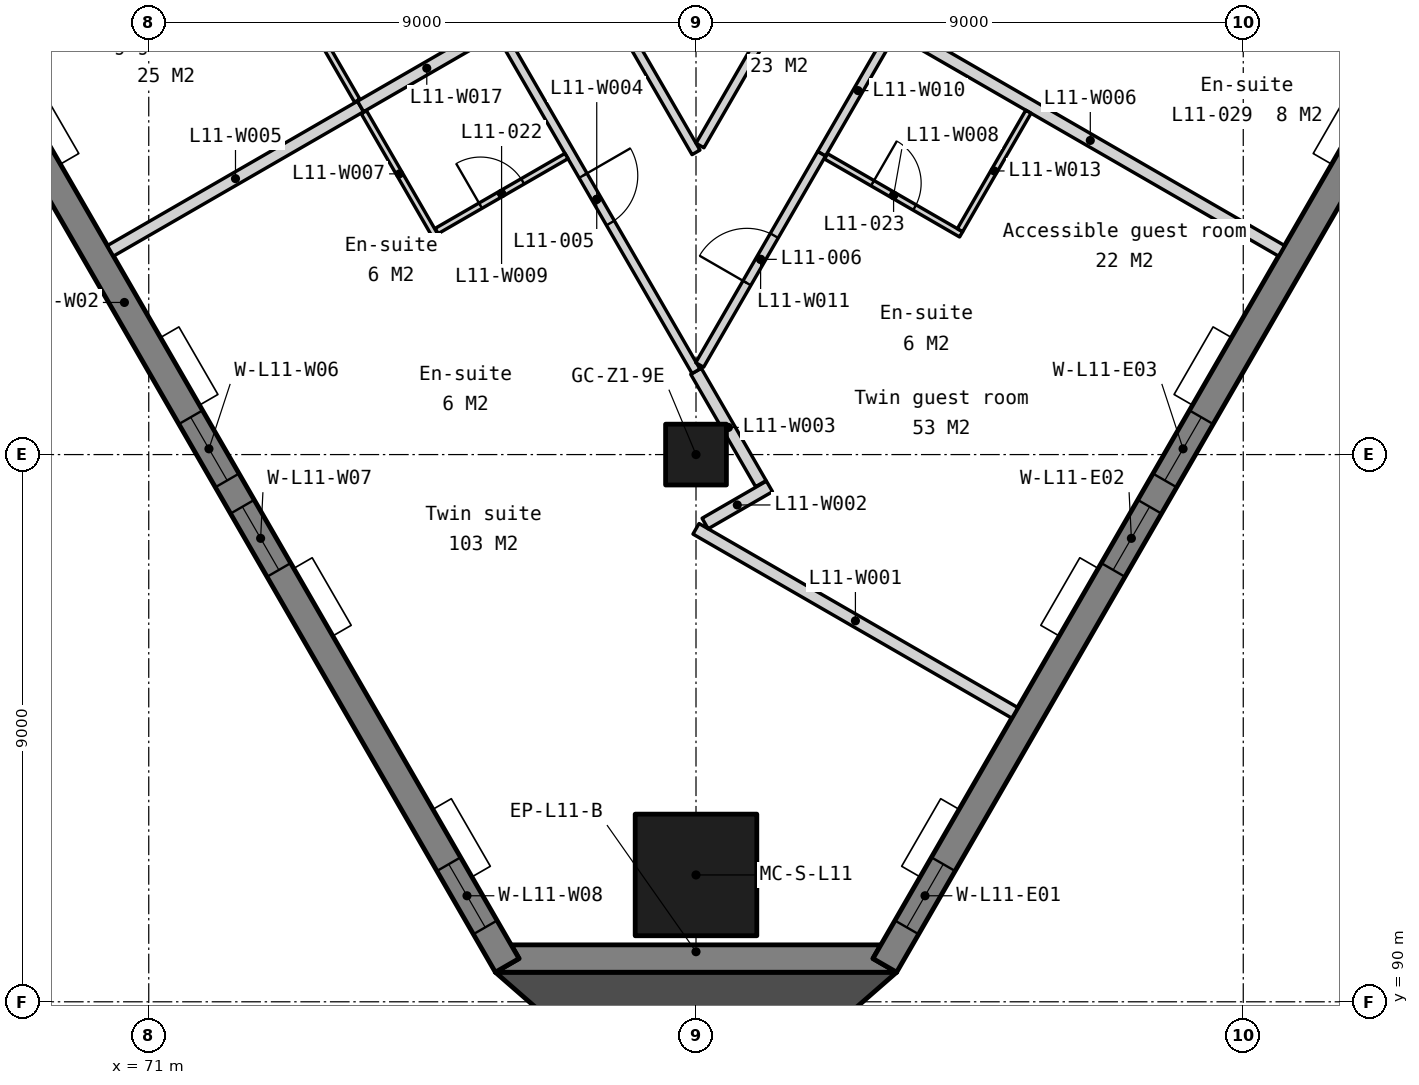
"""IFC4 building model, lengths in metres.
Left out: names, types, materials, properties, quantities, classifications, styles, units other than length and angle.
Written with IfcOpenShell. Run it as: python <this file> out.ifc"""

import sys

from ifc_helpers import new_model, si_unit, direction, frame, frame_2d, origin, origin_2d, place, context, subcontext, project, spatial, polyline, rectangle, outline, extrude, element, fill, save


model = new_model("IFC4")
c1 = context("Model", 3, precision=1e-05, world=origin(), true_north=direction((0.0, 1.0)))
c2 = subcontext(c1, "Body", "Model", "MODEL_VIEW")
j1 = project(units=[si_unit("LENGTHUNIT", "METRE"), si_unit("PLANEANGLEUNIT", "RADIAN")], contexts=[c1])
p1 = place(None, origin())
s1 = spatial("IfcSite", under=j1, at=p1, CompositionType="ELEMENT")
p2 = place(p1, origin())
s2 = spatial("IfcBuilding", under=s1, at=p2, CompositionType="ELEMENT")
p3 = place(p2, frame((0.0, 0.0, 52.5)))
s3 = spatial("IfcBuildingStorey", under=s2, at=p3, CompositionType="ELEMENT", Elevation=52.5)
p4 = place(p3, frame((80.0, 99.0, 0.0), z_axis=(0.0, 0.0, 1.0), x_axis=(1.0, 0.0, 0.0)))
e1 = element("IfcColumn", 1, at=p4, inside=s3, PredefinedType="COLUMN", context=c2, shape_type="SweptSolid", body=[
    extrude(rectangle(XDim=1.0, YDim=1.0, at=origin_2d()), origin(), (0.0, 0.0, 1.0), 3.5),
])
p5 = place(p3, frame((80.0, 92.086, 0.0), z_axis=(0.0, 0.0, 1.0), x_axis=(1.0, 0.0, 0.0)))
e2 = element("IfcColumn", 2, at=p5, inside=s3, PredefinedType="COLUMN", context=c2, shape_type="SweptSolid", body=[
    extrude(rectangle(XDim=2.0, YDim=2.0, at=origin_2d()), origin(), (0.0, 0.0, 1.0), 3.5),
])
p6 = place(p3, frame((0.0, 0.0, -0.15)))
e3 = element("IfcWall", 3, at=p6, inside=s3, PredefinedType="SOLIDWALL", context=c2, shape_type="SweptSolid", body=[
    extrude(outline(polyline([(76.7, 90.486), (77.09, 90.711), (76.96, 90.936), (83.04, 90.936), (82.91, 90.711), (83.3, 90.486), (76.7, 90.486)])), origin(), (0.0, 0.0, 1.0), 3.5),
])
p7 = place(p3, frame((64.305, 112.405, -0.15), z_axis=(0.0, 0.0, 1.0), x_axis=(0.499997464327, -0.866026867751, 0.0)))
e4 = element("IfcWall", 4, at=p7, inside=s3, PredefinedType="SOLIDWALL", context=c2, shape_type="SweptSolid", body=[
    extrude(outline(polyline([(25.18, 3.5), (25.18, 0.0), (0.0, 0.0), (0.0, 3.5), (25.18, 3.5)])), frame((0.0, 0.225, 0.0), z_axis=(0.0, -1.0, 0.0), x_axis=(1.0, 0.0, 0.0)), (0.0, 0.0, 1.0), 0.45),
])
p8 = place(p7, frame((5.81, 0.0, 1.05)))
e5 = element("IfcOpeningElement", 5, at=p8, cuts=e4, PredefinedType="OPENING", context=c2, shape_type="SweptSolid", body=[
    extrude(rectangle(XDim=1.2, YDim=1.5, at=frame_2d((0.6, 0.75))), frame((0.0, 0.235, 0.0), z_axis=(0.0, -1.0, 0.0), x_axis=(1.0, 0.0, 0.0)), (0.0, 0.0, 1.0), 0.47),
])
p9 = place(p7, frame((7.51, 0.0, 1.05)))
e6 = element("IfcOpeningElement", 6, at=p9, cuts=e4, PredefinedType="OPENING", context=c2, shape_type="SweptSolid", body=[
    extrude(rectangle(XDim=1.2, YDim=1.5, at=frame_2d((0.6, 0.75))), frame((0.0, 0.235, 0.0), z_axis=(0.0, -1.0, 0.0), x_axis=(1.0, 0.0, 0.0)), (0.0, 0.0, 1.0), 0.47),
])
p10 = place(p7, frame((14.77, 0.0, 1.05)))
e7 = element("IfcOpeningElement", 7, at=p10, cuts=e4, PredefinedType="OPENING", context=c2, shape_type="SweptSolid", body=[
    extrude(rectangle(XDim=1.2, YDim=1.5, at=frame_2d((0.6, 0.75))), frame((0.0, 0.235, 0.0), z_axis=(0.0, -1.0, 0.0), x_axis=(1.0, 0.0, 0.0)), (0.0, 0.0, 1.0), 0.47),
])
p11 = place(p7, frame((16.47, 0.0, 1.05)))
e8 = element("IfcOpeningElement", 8, at=p11, cuts=e4, PredefinedType="OPENING", context=c2, shape_type="SweptSolid", body=[
    extrude(rectangle(XDim=1.2, YDim=1.5, at=frame_2d((0.6, 0.75))), frame((0.0, 0.235, 0.0), z_axis=(0.0, -1.0, 0.0), x_axis=(1.0, 0.0, 0.0)), (0.0, 0.0, 1.0), 0.47),
])
p12 = place(p7, frame((23.258, 0.0, 1.05)))
e9 = element("IfcOpeningElement", 9, at=p12, cuts=e4, PredefinedType="OPENING", context=c2, shape_type="SweptSolid", body=[
    extrude(rectangle(XDim=1.2, YDim=1.5, at=frame_2d((0.6, 0.75))), frame((0.0, 0.235, 0.0), z_axis=(0.0, -1.0, 0.0), x_axis=(1.0, 0.0, 0.0)), (0.0, 0.0, 1.0), 0.47),
])
p13 = place(p3, frame((83.105, 90.599, -0.15), z_axis=(0.0, 0.0, 1.0), x_axis=(0.499999201451, 0.866025864826, 0.0)))
e10 = element("IfcWall", 10, at=p13, inside=s3, PredefinedType="SOLIDWALL", context=c2, shape_type="SweptSolid", body=[
    extrude(outline(polyline([(44.8, 0.0), (44.8, 3.5), (0.0, 3.5), (0.0, 0.0), (44.8, 0.0)])), frame((0.0, 0.225, 0.0), z_axis=(0.0, -1.0, 0.0), x_axis=(1.0, 0.0, 0.0)), (0.0, 0.0, 1.0), 0.45),
])
p14 = place(p13, frame((0.722, 0.0, 1.05)))
e11 = element("IfcOpeningElement", 11, at=p14, cuts=e10, PredefinedType="OPENING", context=c2, shape_type="SweptSolid", body=[
    extrude(rectangle(XDim=1.2, YDim=1.5, at=frame_2d((0.6, 0.75))), frame((0.0, 0.235, 0.0), z_axis=(0.0, -1.0, 0.0), x_axis=(1.0, 0.0, 0.0)), (0.0, 0.0, 1.0), 0.47),
])
p15 = place(p13, frame((7.51, 0.0, 1.05)))
e12 = element("IfcOpeningElement", 12, at=p15, cuts=e10, PredefinedType="OPENING", context=c2, shape_type="SweptSolid", body=[
    extrude(rectangle(XDim=1.2, YDim=1.5, at=frame_2d((0.6, 0.75))), frame((0.0, 0.235, 0.0), z_axis=(0.0, -1.0, 0.0), x_axis=(1.0, 0.0, 0.0)), (0.0, 0.0, 1.0), 0.47),
])
p16 = place(p13, frame((9.21, 0.0, 1.05)))
e13 = element("IfcOpeningElement", 13, at=p16, cuts=e10, PredefinedType="OPENING", context=c2, shape_type="SweptSolid", body=[
    extrude(rectangle(XDim=1.2, YDim=1.5, at=frame_2d((0.6, 0.75))), frame((0.0, 0.235, 0.0), z_axis=(0.0, -1.0, 0.0), x_axis=(1.0, 0.0, 0.0)), (0.0, 0.0, 1.0), 0.47),
])
p17 = place(p13, frame((16.47, 0.0, 1.05)))
e14 = element("IfcOpeningElement", 14, at=p17, cuts=e10, PredefinedType="OPENING", context=c2, shape_type="SweptSolid", body=[
    extrude(rectangle(XDim=1.2, YDim=1.5, at=frame_2d((0.6, 0.75))), frame((0.0, 0.235, 0.0), z_axis=(0.0, -1.0, 0.0), x_axis=(1.0, 0.0, 0.0)), (0.0, 0.0, 1.0), 0.47),
])
p18 = place(p13, frame((18.17, 0.0, 1.05)))
e15 = element("IfcOpeningElement", 15, at=p18, cuts=e10, PredefinedType="OPENING", context=c2, shape_type="SweptSolid", body=[
    extrude(rectangle(XDim=1.2, YDim=1.5, at=frame_2d((0.6, 0.75))), frame((0.0, 0.235, 0.0), z_axis=(0.0, -1.0, 0.0), x_axis=(1.0, 0.0, 0.0)), (0.0, 0.0, 1.0), 0.47),
])
p19 = place(p13, frame((25.43, 0.0, 1.05)))
e16 = element("IfcOpeningElement", 16, at=p19, cuts=e10, PredefinedType="OPENING", context=c2, shape_type="SweptSolid", body=[
    extrude(rectangle(XDim=1.2, YDim=1.5, at=frame_2d((0.6, 0.75))), frame((0.0, 0.235, 0.0), z_axis=(0.0, -1.0, 0.0), x_axis=(1.0, 0.0, 0.0)), (0.0, 0.0, 1.0), 0.47),
])
p20 = place(p13, frame((27.13, 0.0, 1.05)))
e17 = element("IfcOpeningElement", 17, at=p20, cuts=e10, PredefinedType="OPENING", context=c2, shape_type="SweptSolid", body=[
    extrude(rectangle(XDim=1.2, YDim=1.5, at=frame_2d((0.6, 0.75))), frame((0.0, 0.235, 0.0), z_axis=(0.0, -1.0, 0.0), x_axis=(1.0, 0.0, 0.0)), (0.0, 0.0, 1.0), 0.47),
])
p21 = place(p13, frame((34.39, 0.0, 1.05)))
e18 = element("IfcOpeningElement", 18, at=p21, cuts=e10, PredefinedType="OPENING", context=c2, shape_type="SweptSolid", body=[
    extrude(rectangle(XDim=1.2, YDim=1.5, at=frame_2d((0.6, 0.75))), frame((0.0, 0.235, 0.0), z_axis=(0.0, -1.0, 0.0), x_axis=(1.0, 0.0, 0.0)), (0.0, 0.0, 1.0), 0.47),
])
p22 = place(p13, frame((36.09, 0.0, 1.05)))
e19 = element("IfcOpeningElement", 19, at=p22, cuts=e10, PredefinedType="OPENING", context=c2, shape_type="SweptSolid", body=[
    extrude(rectangle(XDim=1.2, YDim=1.5, at=frame_2d((0.6, 0.75))), frame((0.0, 0.235, 0.0), z_axis=(0.0, -1.0, 0.0), x_axis=(1.0, 0.0, 0.0)), (0.0, 0.0, 1.0), 0.47),
])
p23 = place(p13, frame((42.878, 0.0, 1.05)))
e20 = element("IfcOpeningElement", 20, at=p23, cuts=e10, PredefinedType="OPENING", context=c2, shape_type="SweptSolid", body=[
    extrude(rectangle(XDim=1.2, YDim=1.5, at=frame_2d((0.6, 0.75))), frame((0.0, 0.235, 0.0), z_axis=(0.0, -1.0, 0.0), x_axis=(1.0, 0.0, 0.0)), (0.0, 0.0, 1.0), 0.47),
])
p24 = place(p3, frame((0.0, 0.0, -0.15)))
e21 = element("IfcWall", 21, at=p24, inside=s3, PredefinedType="SOLIDWALL", context=c2, shape_type="SweptSolid", body=[
    extrude(outline(polyline([(76.7, 90.486), (80.0, 87.607), (83.3, 90.486), (76.7, 90.486)])), origin(), (0.0, 0.0, 1.0), 3.5),
])
p25 = place(p3, frame((80.0, 97.779, 0.0), z_axis=(0.0, 0.0, 1.0), x_axis=(0.866028448709, -0.499994725999, 0.0)))
e22 = element("IfcWall", 22, at=p25, inside=s3, PredefinedType="PARTITIONING", context=c2, shape_type="SweptSolid", body=[
    extrude(rectangle(XDim=6.054, YDim=0.2, at=frame_2d((3.027, 0.0))), origin(), (0.0, 0.0, 1.0), 3.35),
])
p26 = place(p3, frame((80.15, 97.866, 0.0), z_axis=(0.0, 0.0, 1.0), x_axis=(0.866095765711, 0.49987810976, 0.0)))
e23 = element("IfcWall", 23, at=p26, inside=s3, PredefinedType="PARTITIONING", context=c2, shape_type="SweptSolid", body=[
    extrude(rectangle(XDim=1.222, YDim=0.2, at=frame_2d((0.611, 0.0))), origin(), (0.0, 0.0, 1.0), 3.35),
])
p27 = place(p3, frame((80.0, 100.371, 0.0), z_axis=(0.0, 0.0, 1.0), x_axis=(0.499818186721, -0.866130348287, 0.0)))
e24 = element("IfcWall", 24, at=p27, inside=s3, PredefinedType="PARTITIONING", context=c2, shape_type="SweptSolid", body=[
    extrude(rectangle(XDim=2.134, YDim=0.2, at=frame_2d((1.067, 0.0))), origin(), (0.0, 0.0, 1.0), 3.35),
])
p28 = place(p3, frame((76.735, 106.026, 0.0), z_axis=(0.0, 0.0, 1.0), x_axis=(0.499995393218, -0.866028063495, 0.0)))
e25 = element("IfcWall", 25, at=p28, inside=s3, PredefinedType="PARTITIONING", context=c2, shape_type="SweptSolid", body=[
    extrude(rectangle(XDim=6.53, YDim=0.15, at=frame_2d((3.265, 0.0))), origin(), (0.0, 0.0, 1.0), 3.35),
])
p29 = place(p28, frame((2.815, 0.0, 0.0)))
e26 = element("IfcOpeningElement", 26, at=p29, cuts=e25, PredefinedType="OPENING", context=c2, shape_type="SweptSolid", body=[
    extrude(rectangle(XDim=0.9, YDim=2.1, at=frame_2d((0.45, 1.05))), frame((0.0, 0.085, 0.0), z_axis=(0.0, -1.0, 0.0), x_axis=(1.0, 0.0, 0.0)), (0.0, 0.0, 1.0), 0.17),
])
p30 = place(p3, frame((70.37, 102.351, 0.0), z_axis=(0.0, 0.0, 1.0), x_axis=(0.866033238375, 0.499986429846, 0.0)))
e27 = element("IfcWall", 27, at=p30, inside=s3, PredefinedType="PARTITIONING", context=c2, shape_type="SweptSolid", body=[
    extrude(rectangle(XDim=4.75, YDim=0.2, at=frame_2d((2.375, 0.0))), origin(), (0.0, 0.0, 1.0), 3.35),
])
p31 = place(p3, frame((83.339, 105.983, 0.0), z_axis=(0.0, 0.0, 1.0), x_axis=(0.866023858256, -0.500002676924, 0.0)))
e28 = element("IfcWall", 28, at=p31, inside=s3, PredefinedType="PARTITIONING", context=c2, shape_type="SweptSolid", body=[
    extrude(rectangle(XDim=7.265, YDim=0.2, at=frame_2d((3.633, 0.0))), origin(), (0.0, 0.0, 1.0), 3.35),
])
p32 = place(p3, frame((74.538, 104.63, 0.0), z_axis=(0.0, 0.0, 1.0), x_axis=(0.499999433879, -0.866025730634, 0.0)))
e29 = element("IfcWall", 29, at=p32, inside=s3, PredefinedType="PARTITIONING", context=c2, shape_type="SweptSolid", body=[
    extrude(rectangle(XDim=2.34, YDim=0.1, at=frame_2d((1.17, 0.0))), origin(), (0.0, 0.0, 1.0), 3.35),
])
p33 = place(p3, frame((82.139, 103.905, 0.0), z_axis=(0.0, 0.0, 1.0), x_axis=(0.866014388206, -0.500019079056, 0.0)))
e30 = element("IfcWall", 30, at=p33, inside=s3, PredefinedType="PARTITIONING", context=c2, shape_type="SweptSolid", body=[
    extrude(rectangle(XDim=2.565, YDim=0.1, at=frame_2d((1.282, 0.0))), origin(), (0.0, 0.0, 1.0), 3.35),
])
p34 = place(p33, frame((0.883, 0.0, 0.0)))
e31 = element("IfcOpeningElement", 31, at=p34, cuts=e30, PredefinedType="OPENING", context=c2, shape_type="SweptSolid", body=[
    extrude(rectangle(XDim=0.8, YDim=2.1, at=frame_2d((0.4, 1.05))), frame((0.0, 0.06, 0.0), z_axis=(0.0, -1.0, 0.0), x_axis=(1.0, 0.0, 0.0)), (0.0, 0.0, 1.0), 0.12),
])
p35 = place(p3, frame((75.735, 102.677, 0.0), z_axis=(0.0, 0.0, 1.0), x_axis=(0.866040446274, 0.499973944738, 0.0)))
e32 = element("IfcWall", 32, at=p35, inside=s3, PredefinedType="PARTITIONING", context=c2, shape_type="SweptSolid", body=[
    extrude(rectangle(XDim=2.465, YDim=0.1, at=frame_2d((1.232, 0.0))), origin(), (0.0, 0.0, 1.0), 3.35),
])
p36 = place(p35, frame((0.833, 0.0, 0.0)))
e33 = element("IfcOpeningElement", 33, at=p36, cuts=e32, PredefinedType="OPENING", context=c2, shape_type="SweptSolid", body=[
    extrude(rectangle(XDim=0.8, YDim=2.1, at=frame_2d((0.4, 1.05))), frame((0.0, 0.06, 0.0), z_axis=(0.0, -1.0, 0.0), x_axis=(1.0, 0.0, 0.0)), (0.0, 0.0, 1.0), 0.12),
])
p37 = place(p3, frame((82.065, 103.947, 0.0), z_axis=(0.0, 0.0, 1.0), x_axis=(0.500001309137, 0.866024647952, 0.0)))
e34 = element("IfcWall", 34, at=p37, inside=s3, PredefinedType="PARTITIONING", context=c2, shape_type="SweptSolid", body=[
    extrude(rectangle(XDim=2.4, YDim=0.15, at=frame_2d((1.2, 0.0))), origin(), (0.0, 0.0, 1.0), 3.35),
])
p38 = place(p3, frame((80.06, 100.474, 0.0), z_axis=(0.0, 0.0, 1.0), x_axis=(0.499963124258, 0.866046692957, 0.0)))
e35 = element("IfcWall", 35, at=p38, inside=s3, PredefinedType="PARTITIONING", context=c2, shape_type="SweptSolid", body=[
    extrude(rectangle(XDim=4.01, YDim=0.15, at=frame_2d((2.005, 0.0))), origin(), (0.0, 0.0, 1.0), 3.35),
])
p39 = place(p38, frame((1.555, 0.0, 0.0)))
e36 = element("IfcOpeningElement", 36, at=p39, cuts=e35, PredefinedType="OPENING", context=c2, shape_type="SweptSolid", body=[
    extrude(rectangle(XDim=0.9, YDim=2.1, at=frame_2d((0.45, 1.05))), frame((0.0, 0.085, 0.0), z_axis=(0.0, -1.0, 0.0), x_axis=(1.0, 0.0, 0.0)), (0.0, 0.0, 1.0), 0.17),
])
p40 = place(p3, frame((73.258, 106.847, 0.0), z_axis=(0.0, 0.0, 1.0), x_axis=(0.499999433879, -0.866025730634, 0.0)))
e37 = element("IfcWall", 37, at=p40, inside=s3, PredefinedType="PARTITIONING", context=c2, shape_type="SweptSolid", body=[
    extrude(rectangle(XDim=2.34, YDim=0.1, at=frame_2d((1.17, 0.0))), origin(), (0.0, 0.0, 1.0), 3.35),
])
p41 = place(p3, frame((84.342, 102.69, 0.0), z_axis=(0.0, 0.0, 1.0), x_axis=(0.499966648284, 0.866044658551, 0.0)))
e38 = element("IfcWall", 38, at=p41, inside=s3, PredefinedType="PARTITIONING", context=c2, shape_type="SweptSolid", body=[
    extrude(rectangle(XDim=2.25, YDim=0.1, at=frame_2d((1.125, 0.0))), origin(), (0.0, 0.0, 1.0), 3.35),
])
p42 = place(p3, frame((74.483, 104.726, 0.0), z_axis=(0.0, 0.0, 1.0), x_axis=(0.866006140796, 0.500033362991, 0.0)))
e39 = element("IfcWall", 39, at=p42, inside=s3, PredefinedType="PARTITIONING", context=c2, shape_type="SweptSolid", body=[
    extrude(rectangle(XDim=2.515, YDim=0.2, at=frame_2d((1.257, 0.0))), origin(), (0.0, 0.0, 1.0), 3.35),
])
p43 = place(p3, frame((76.961, 109.234, 0.0), z_axis=(0.0, 0.0, 1.0), x_axis=(0.499984420002, -0.866034398714, 0.0)))
e40 = element("IfcWall", 40, at=p43, inside=s3, PredefinedType="PARTITIONING", context=c2, shape_type="SweptSolid", body=[
    extrude(rectangle(XDim=6.077, YDim=0.15, at=frame_2d((3.039, 0.0))), origin(), (0.0, 0.0, 1.0), 3.35),
])
p44 = place(p3, frame((80.065, 104.083, 0.0), z_axis=(0.0, 0.0, 1.0), x_axis=(0.49999109456, 0.866030545282, 0.0)))
e41 = element("IfcWall", 41, at=p44, inside=s3, PredefinedType="PARTITIONING", context=c2, shape_type="SweptSolid", body=[
    extrude(rectangle(XDim=8.391, YDim=0.15, at=frame_2d((4.196, 0.0))), origin(), (0.0, 0.0, 1.0), 3.35),
])
p45 = place(p44, frame((3.746, 0.0, 0.0)))
e42 = element("IfcOpeningElement", 42, at=p45, cuts=e41, PredefinedType="OPENING", context=c2, shape_type="SweptSolid", body=[
    extrude(rectangle(XDim=0.9, YDim=2.1, at=frame_2d((0.45, 1.05))), frame((0.0, 0.085, 0.0), z_axis=(0.0, -1.0, 0.0), x_axis=(1.0, 0.0, 0.0)), (0.0, 0.0, 1.0), 0.17),
])
p46 = place(p10, origin())
e43 = element("IfcWindow", 43, at=p46, inside=s3, PartitioningType="SINGLE_PANEL", PredefinedType="WINDOW", context=c2, shape_type="SweptSolid", body=[
    extrude(rectangle(XDim=1.2, YDim=1.5, at=frame_2d((0.6, 0.75))), frame((0.0, 0.03, 0.0), z_axis=(0.0, -1.0, 0.0), x_axis=(1.0, 0.0, 0.0)), (0.0, 0.0, 1.0), 0.06),
])
fill(e7, e43)
p47 = place(p11, origin())
e44 = element("IfcWindow", 44, at=p47, inside=s3, PartitioningType="SINGLE_PANEL", PredefinedType="WINDOW", context=c2, shape_type="SweptSolid", body=[
    extrude(rectangle(XDim=1.2, YDim=1.5, at=frame_2d((0.6, 0.75))), frame((0.0, 0.03, 0.0), z_axis=(0.0, -1.0, 0.0), x_axis=(1.0, 0.0, 0.0)), (0.0, 0.0, 1.0), 0.06),
])
fill(e8, e44)
p48 = place(p12, origin())
e45 = element("IfcWindow", 45, at=p48, inside=s3, PartitioningType="SINGLE_PANEL", PredefinedType="WINDOW", context=c2, shape_type="SweptSolid", body=[
    extrude(rectangle(XDim=1.2, YDim=1.5, at=frame_2d((0.6, 0.75))), frame((0.0, 0.03, 0.0), z_axis=(0.0, -1.0, 0.0), x_axis=(1.0, 0.0, 0.0)), (0.0, 0.0, 1.0), 0.06),
])
fill(e9, e45)
p49 = place(p14, origin())
e46 = element("IfcWindow", 46, at=p49, inside=s3, PartitioningType="SINGLE_PANEL", PredefinedType="WINDOW", context=c2, shape_type="SweptSolid", body=[
    extrude(rectangle(XDim=1.2, YDim=1.5, at=frame_2d((0.6, 0.75))), frame((0.0, 0.03, 0.0), z_axis=(0.0, -1.0, 0.0), x_axis=(1.0, 0.0, 0.0)), (0.0, 0.0, 1.0), 0.06),
])
fill(e11, e46)
p50 = place(p15, origin())
e47 = element("IfcWindow", 47, at=p50, inside=s3, PartitioningType="SINGLE_PANEL", PredefinedType="WINDOW", context=c2, shape_type="SweptSolid", body=[
    extrude(rectangle(XDim=1.2, YDim=1.5, at=frame_2d((0.6, 0.75))), frame((0.0, 0.03, 0.0), z_axis=(0.0, -1.0, 0.0), x_axis=(1.0, 0.0, 0.0)), (0.0, 0.0, 1.0), 0.06),
])
fill(e12, e47)
p51 = place(p16, origin())
e48 = element("IfcWindow", 48, at=p51, inside=s3, PartitioningType="SINGLE_PANEL", PredefinedType="WINDOW", context=c2, shape_type="SweptSolid", body=[
    extrude(rectangle(XDim=1.2, YDim=1.5, at=frame_2d((0.6, 0.75))), frame((0.0, 0.03, 0.0), z_axis=(0.0, -1.0, 0.0), x_axis=(1.0, 0.0, 0.0)), (0.0, 0.0, 1.0), 0.06),
])
fill(e13, e48)
p52 = place(p29, origin())
e49 = element("IfcDoor", 49, at=p52, inside=s3, OperationType="SINGLE_SWING_LEFT", PredefinedType="DOOR", context=c2, shape_type="SweptSolid", body=[
    extrude(rectangle(XDim=0.9, YDim=2.1, at=frame_2d((0.45, 1.05))), frame((0.0, 0.025, 0.0), z_axis=(0.0, -1.0, 0.0), x_axis=(1.0, 0.0, 0.0)), (0.0, 0.0, 1.0), 0.05),
])
fill(e26, e49)
p53 = place(p39, origin())
e50 = element("IfcDoor", 50, at=p53, inside=s3, OperationType="SINGLE_SWING_LEFT", PredefinedType="DOOR", context=c2, shape_type="SweptSolid", body=[
    extrude(rectangle(XDim=0.9, YDim=2.1, at=frame_2d((0.45, 1.05))), frame((0.0, 0.025, 0.0), z_axis=(0.0, -1.0, 0.0), x_axis=(1.0, 0.0, 0.0)), (0.0, 0.0, 1.0), 0.05),
])
fill(e36, e50)
p54 = place(p36, origin())
e51 = element("IfcDoor", 51, at=p54, inside=s3, OperationType="SINGLE_SWING_LEFT", PredefinedType="DOOR", context=c2, shape_type="SweptSolid", body=[
    extrude(rectangle(XDim=0.8, YDim=2.1, at=frame_2d((0.4, 1.05))), frame((0.0, 0.025, 0.0), z_axis=(0.0, -1.0, 0.0), x_axis=(1.0, 0.0, 0.0)), (0.0, 0.0, 1.0), 0.05),
])
fill(e33, e51)
p55 = place(p34, origin())
e52 = element("IfcDoor", 52, at=p55, inside=s3, OperationType="SINGLE_SWING_LEFT", PredefinedType="DOOR", context=c2, shape_type="SweptSolid", body=[
    extrude(rectangle(XDim=0.8, YDim=2.1, at=frame_2d((0.4, 1.05))), frame((0.0, 0.025, 0.0), z_axis=(0.0, -1.0, 0.0), x_axis=(1.0, 0.0, 0.0)), (0.0, 0.0, 1.0), 0.05),
])
fill(e31, e52)
save(model, sys.argv[1])
